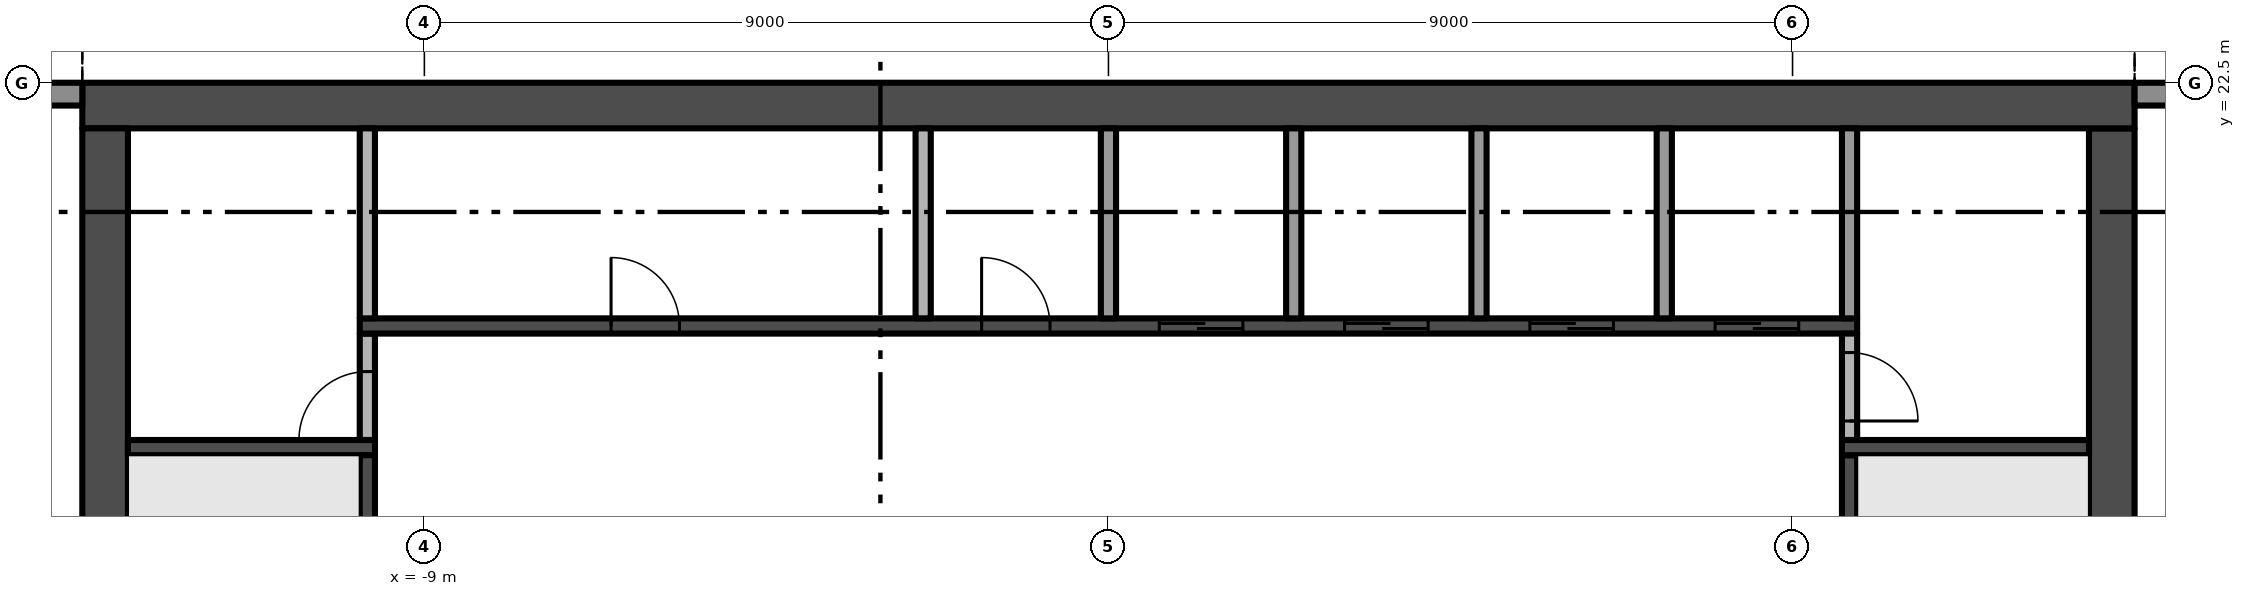
"""IFC4 building model, lengths in metres.
Left out: names, types, materials, properties, quantities, classifications, styles, units other than length and angle.
Written with IfcOpenShell. Run it as: python <this file> out.ifc"""

import sys

from ifc_helpers import new_model, si_unit, direction, frame, frame_2d, origin, place, context, subcontext, project, spatial, rectangle, extrude, element, fill, save


model = new_model("IFC4")
c1 = context("Model", 3, precision=1e-05, world=origin(), true_north=direction((0.0, 1.0)))
c2 = subcontext(c1, "Body", "Model", "MODEL_VIEW")
j1 = project(units=[si_unit("LENGTHUNIT", "METRE"), si_unit("PLANEANGLEUNIT", "RADIAN")], contexts=[c1])
p1 = place(None, origin())
s1 = spatial("IfcSite", under=j1, at=p1, CompositionType="ELEMENT")
p2 = place(p1, origin())
s2 = spatial("IfcBuilding", under=s1, at=p2, CompositionType="ELEMENT")
p3 = place(p2, frame((0.0, 0.0, 242.6)))
s3 = spatial("IfcBuildingStorey", under=s2, at=p3, CompositionType="ELEMENT", Elevation=242.6)
p4 = place(p3, frame((13.2, 5.1, -0.3), z_axis=(0.0, 0.0, 1.0), x_axis=(0.0, 1.0, 0.0)))
e1 = element("IfcWall", 1, at=p4, inside=s3, PredefinedType="SHEAR", context=c2, shape_type="SweptSolid", body=[
    extrude(rectangle(XDim=16.8, YDim=0.6, at=frame_2d((8.4, 0.0))), origin(), (0.0, 0.0, 1.0), 3.8),
])
p5 = place(p4, frame((6.3, 0.0, 0.3)))
e2 = element("IfcOpeningElement", 2, at=p5, cuts=e1, PredefinedType="OPENING", context=c2, shape_type="SweptSolid", body=[
    extrude(rectangle(XDim=1.2, YDim=2.2, at=frame_2d((0.6, 1.1))), frame((0.0, 0.31, 0.0), z_axis=(0.0, -1.0, 0.0), x_axis=(1.0, 0.0, 0.0)), (0.0, 0.0, 1.0), 0.62),
])
p6 = place(p3, frame((13.5, 22.2, -0.3), z_axis=(0.0, 0.0, 1.0), x_axis=(-1.0, 0.0, 0.0)))
e3 = element("IfcWall", 3, at=p6, inside=s3, PredefinedType="SHEAR", context=c2, shape_type="SweptSolid", body=[
    extrude(rectangle(XDim=27.0, YDim=0.6, at=frame_2d((13.5, 0.0))), origin(), (0.0, 0.0, 1.0), 3.8),
])
p7 = place(p3, frame((-13.2, 21.9, -0.3), z_axis=(0.0, 0.0, 1.0), x_axis=(0.0, -1.0, 0.0)))
e4 = element("IfcWall", 4, at=p7, inside=s3, PredefinedType="SHEAR", context=c2, shape_type="SweptSolid", body=[
    extrude(rectangle(XDim=16.8, YDim=0.6, at=frame_2d((8.4, 0.0))), origin(), (0.0, 0.0, 1.0), 3.8),
])
p8 = place(p7, frame((9.3, 0.0, 0.3)))
e5 = element("IfcOpeningElement", 5, at=p8, cuts=e4, PredefinedType="OPENING", context=c2, shape_type="SweptSolid", body=[
    extrude(rectangle(XDim=1.2, YDim=2.2, at=frame_2d((0.6, 1.1))), frame((0.0, 0.31, 0.0), z_axis=(0.0, -1.0, 0.0), x_axis=(1.0, 0.0, 0.0)), (0.0, 0.0, 1.0), 0.62),
])
p9 = place(p3, frame((13.5, 22.35, 0.0), z_axis=(0.0, 0.0, 1.0), x_axis=(1.0, 0.0, 0.0)))
e6 = element("IfcWall", 6, at=p9, inside=s3, PredefinedType="SOLIDWALL", context=c2, shape_type="SweptSolid", body=[
    extrude(rectangle(XDim=4.05, YDim=0.3, at=frame_2d((2.025, 0.0))), origin(), (0.0, 0.0, 1.0), 3.5),
])
p10 = place(p9, frame((0.55, 0.0, 0.45)))
e7 = element("IfcOpeningElement", 7, at=p10, cuts=e6, PredefinedType="OPENING", context=c2, shape_type="SweptSolid", body=[
    extrude(rectangle(XDim=3.2, YDim=2.65, at=frame_2d((1.6, 1.325))), frame((0.0, 0.16, 0.0), z_axis=(0.0, -1.0, 0.0), x_axis=(1.0, 0.0, 0.0)), (0.0, 0.0, 1.0), 0.32),
])
p11 = place(p3, frame((-17.55, 22.35, 0.0), z_axis=(0.0, 0.0, 1.0), x_axis=(1.0, 0.0, 0.0)))
e8 = element("IfcWall", 8, at=p11, inside=s3, PredefinedType="SOLIDWALL", context=c2, shape_type="SweptSolid", body=[
    extrude(rectangle(XDim=4.05, YDim=0.3, at=frame_2d((2.025, 0.0))), origin(), (0.0, 0.0, 1.0), 3.5),
])
p12 = place(p11, frame((0.3, 0.0, 0.0)))
e9 = element("IfcOpeningElement", 9, at=p12, cuts=e8, PredefinedType="OPENING", context=c2, shape_type="SweptSolid", body=[
    extrude(rectangle(XDim=3.2, YDim=2.4, at=frame_2d((1.6, 1.2))), frame((0.0, 0.16, 0.0), z_axis=(0.0, -1.0, 0.0), x_axis=(1.0, 0.0, 0.0)), (0.0, 0.0, 1.0), 0.32),
])
p13 = place(p3, frame((-12.9, 17.7, 0.0), z_axis=(0.0, 0.0, 1.0), x_axis=(1.0, 0.0, 0.0)))
e10 = element("IfcWall", 10, at=p13, inside=s3, PredefinedType="SHEAR", context=c2, shape_type="SweptSolid", body=[
    extrude(rectangle(XDim=3.25, YDim=0.2, at=frame_2d((1.625, 0.0))), origin(), (0.0, 0.0, 1.0), 3.5),
])
p14 = place(p3, frame((-9.75, 16.1, 0.0), z_axis=(0.0, 0.0, 1.0), x_axis=(0.0, 1.0, 0.0)))
e11 = element("IfcWall", 11, at=p14, inside=s3, PredefinedType="SHEAR", context=c2, shape_type="SweptSolid", body=[
    extrude(rectangle(XDim=1.5, YDim=0.2, at=frame_2d((0.75, 0.0))), origin(), (0.0, 0.0, 1.0), 3.5),
])
p15 = place(p3, frame((-9.75, 17.8, 0.0), z_axis=(0.0, 0.0, 1.0), x_axis=(0.0, 1.0, 0.0)))
e12 = element("IfcWall", 12, at=p15, inside=s3, PredefinedType="PARTITIONING", context=c2, shape_type="SweptSolid", body=[
    extrude(rectangle(XDim=1.4, YDim=0.2, at=frame_2d((0.7, 0.0))), origin(), (0.0, 0.0, 1.0), 3.5),
])
p16 = place(p15, origin())
e13 = element("IfcOpeningElement", 13, at=p16, cuts=e12, PredefinedType="OPENING", context=c2, shape_type="SweptSolid", body=[
    extrude(rectangle(XDim=0.9, YDim=2.1, at=frame_2d((0.45, 1.05))), frame((0.0, 0.11, 0.0), z_axis=(0.0, -1.0, 0.0), x_axis=(1.0, 0.0, 0.0)), (0.0, 0.0, 1.0), 0.22),
])
p17 = place(p3, frame((-9.85, 19.3, 0.0), z_axis=(0.0, 0.0, 1.0), x_axis=(1.0, 0.0, 0.0)))
e14 = element("IfcWall", 14, at=p17, inside=s3, PredefinedType="SHEAR", context=c2, shape_type="SweptSolid", body=[
    extrude(rectangle(XDim=19.7, YDim=0.2, at=frame_2d((9.85, 0.0))), origin(), (0.0, 0.0, 1.0), 3.5),
])
p18 = place(p17, frame((10.519, 0.0, 0.0)))
e15 = element("IfcOpeningElement", 15, at=p18, cuts=e14, PredefinedType="OPENING", context=c2, shape_type="SweptSolid", body=[
    extrude(rectangle(XDim=1.1, YDim=2.1, at=frame_2d((0.55, 1.05))), frame((0.0, 0.11, 0.0), z_axis=(0.0, -1.0, 0.0), x_axis=(1.0, 0.0, 0.0)), (0.0, 0.0, 1.0), 0.22),
])
p19 = place(p17, frame((12.956, 0.0, 0.0)))
e16 = element("IfcOpeningElement", 16, at=p19, cuts=e14, PredefinedType="OPENING", context=c2, shape_type="SweptSolid", body=[
    extrude(rectangle(XDim=1.1, YDim=2.1, at=frame_2d((0.55, 1.05))), frame((0.0, 0.11, 0.0), z_axis=(0.0, -1.0, 0.0), x_axis=(1.0, 0.0, 0.0)), (0.0, 0.0, 1.0), 0.22),
])
p20 = place(p17, frame((15.394, 0.0, 0.0)))
e17 = element("IfcOpeningElement", 17, at=p20, cuts=e14, PredefinedType="OPENING", context=c2, shape_type="SweptSolid", body=[
    extrude(rectangle(XDim=1.1, YDim=2.1, at=frame_2d((0.55, 1.05))), frame((0.0, 0.11, 0.0), z_axis=(0.0, -1.0, 0.0), x_axis=(1.0, 0.0, 0.0)), (0.0, 0.0, 1.0), 0.22),
])
p21 = place(p17, frame((17.831, 0.0, 0.0)))
e18 = element("IfcOpeningElement", 18, at=p21, cuts=e14, PredefinedType="OPENING", context=c2, shape_type="SweptSolid", body=[
    extrude(rectangle(XDim=1.1, YDim=2.1, at=frame_2d((0.55, 1.05))), frame((0.0, 0.11, 0.0), z_axis=(0.0, -1.0, 0.0), x_axis=(1.0, 0.0, 0.0)), (0.0, 0.0, 1.0), 0.22),
])
p22 = place(p17, frame((3.306, 0.0, 0.0)))
e19 = element("IfcOpeningElement", 19, at=p22, cuts=e14, PredefinedType="OPENING", context=c2, shape_type="SweptSolid", body=[
    extrude(rectangle(XDim=0.9, YDim=2.1, at=frame_2d((0.45, 1.05))), frame((0.0, 0.11, 0.0), z_axis=(0.0, -1.0, 0.0), x_axis=(1.0, 0.0, 0.0)), (0.0, 0.0, 1.0), 0.22),
])
p23 = place(p17, frame((8.181, 0.0, 0.0)))
e20 = element("IfcOpeningElement", 20, at=p23, cuts=e14, PredefinedType="OPENING", context=c2, shape_type="SweptSolid", body=[
    extrude(rectangle(XDim=0.9, YDim=2.1, at=frame_2d((0.45, 1.05))), frame((0.0, 0.11, 0.0), z_axis=(0.0, -1.0, 0.0), x_axis=(1.0, 0.0, 0.0)), (0.0, 0.0, 1.0), 0.22),
])
for number, where, z_axis, x_axis in (
    (21, (-9.75, 19.4, 0.0), (0.0, 0.0, 1.0), (0.0, 1.0, 0.0)),
    (22, (-2.438, 19.4, 0.0), (0.0, 0.0, 1.0), (0.0, 1.0, 0.0)),
    (23, (0.0, 19.4, 0.0), (0.0, 0.0, 1.0), (0.0, 1.0, 0.0)),
    (24, (2.438, 19.4, 0.0), (0.0, 0.0, 1.0), (0.0, 1.0, 0.0)),
    (25, (4.875, 19.4, 0.0), (0.0, 0.0, 1.0), (0.0, 1.0, 0.0)),
    (26, (7.312, 19.4, 0.0), (0.0, 0.0, 1.0), (0.0, 1.0, 0.0)),
):
    element("IfcWall", number, at=place(p3, frame(where, z_axis=z_axis, x_axis=x_axis)), inside=s3, PredefinedType="PARTITIONING", context=c2, shape_type="SweptSolid", body=[
        extrude(rectangle(XDim=2.5, YDim=0.2, at=frame_2d((1.25, 0.0))), origin(), (0.0, 0.0, 1.0), 3.5),
    ])
p24 = place(p3, frame((9.75, 16.1, 0.0), z_axis=(0.0, 0.0, 1.0), x_axis=(0.0, 1.0, 0.0)))
e27 = element("IfcWall", 27, at=p24, inside=s3, PredefinedType="SHEAR", context=c2, shape_type="SweptSolid", body=[
    extrude(rectangle(XDim=1.5, YDim=0.2, at=frame_2d((0.75, 0.0))), origin(), (0.0, 0.0, 1.0), 3.5),
])
p25 = place(p3, frame((9.65, 17.7, 0.0), z_axis=(0.0, 0.0, 1.0), x_axis=(1.0, 0.0, 0.0)))
e28 = element("IfcWall", 28, at=p25, inside=s3, PredefinedType="SHEAR", context=c2, shape_type="SweptSolid", body=[
    extrude(rectangle(XDim=3.25, YDim=0.2, at=frame_2d((1.625, 0.0))), origin(), (0.0, 0.0, 1.0), 3.5),
])
p26 = place(p3, frame((9.75, 19.2, 0.0), z_axis=(0.0, 0.0, 1.0), x_axis=(0.0, -1.0, 0.0)))
e29 = element("IfcWall", 29, at=p26, inside=s3, PredefinedType="PARTITIONING", context=c2, shape_type="SweptSolid", body=[
    extrude(rectangle(XDim=1.4, YDim=0.2, at=frame_2d((0.7, 0.0))), origin(), (0.0, 0.0, 1.0), 3.5),
])
p27 = place(p26, frame((0.25, 0.0, 0.0)))
e30 = element("IfcOpeningElement", 30, at=p27, cuts=e29, PredefinedType="OPENING", context=c2, shape_type="SweptSolid", body=[
    extrude(rectangle(XDim=0.9, YDim=2.1, at=frame_2d((0.45, 1.05))), frame((0.0, 0.11, 0.0), z_axis=(0.0, -1.0, 0.0), x_axis=(1.0, 0.0, 0.0)), (0.0, 0.0, 1.0), 0.22),
])
p28 = place(p3, frame((9.75, 19.4, 0.0), z_axis=(0.0, 0.0, 1.0), x_axis=(0.0, 1.0, 0.0)))
e31 = element("IfcWall", 31, at=p28, inside=s3, PredefinedType="PARTITIONING", context=c2, shape_type="SweptSolid", body=[
    extrude(rectangle(XDim=2.5, YDim=0.2, at=frame_2d((1.25, 0.0))), origin(), (0.0, 0.0, 1.0), 3.5),
])
p29 = place(p18, origin())
e32 = element("IfcDoor", 32, at=p29, inside=s3, OperationType="SLIDING_TO_RIGHT", PredefinedType="DOOR", context=c2, shape_type="SweptSolid", body=[
    extrude(rectangle(XDim=1.1, YDim=2.1, at=frame_2d((0.55, 1.05))), frame((0.0, 0.025, 0.0), z_axis=(0.0, -1.0, 0.0), x_axis=(1.0, 0.0, 0.0)), (0.0, 0.0, 1.0), 0.05),
])
fill(e15, e32)
p30 = place(p19, origin())
e33 = element("IfcDoor", 33, at=p30, inside=s3, OperationType="SLIDING_TO_RIGHT", PredefinedType="DOOR", context=c2, shape_type="SweptSolid", body=[
    extrude(rectangle(XDim=1.1, YDim=2.1, at=frame_2d((0.55, 1.05))), frame((0.0, 0.025, 0.0), z_axis=(0.0, -1.0, 0.0), x_axis=(1.0, 0.0, 0.0)), (0.0, 0.0, 1.0), 0.05),
])
fill(e16, e33)
p31 = place(p20, origin())
e34 = element("IfcDoor", 34, at=p31, inside=s3, OperationType="SLIDING_TO_RIGHT", PredefinedType="DOOR", context=c2, shape_type="SweptSolid", body=[
    extrude(rectangle(XDim=1.1, YDim=2.1, at=frame_2d((0.55, 1.05))), frame((0.0, 0.025, 0.0), z_axis=(0.0, -1.0, 0.0), x_axis=(1.0, 0.0, 0.0)), (0.0, 0.0, 1.0), 0.05),
])
fill(e17, e34)
p32 = place(p21, origin())
e35 = element("IfcDoor", 35, at=p32, inside=s3, OperationType="SLIDING_TO_RIGHT", PredefinedType="DOOR", context=c2, shape_type="SweptSolid", body=[
    extrude(rectangle(XDim=1.1, YDim=2.1, at=frame_2d((0.55, 1.05))), frame((0.0, 0.025, 0.0), z_axis=(0.0, -1.0, 0.0), x_axis=(1.0, 0.0, 0.0)), (0.0, 0.0, 1.0), 0.05),
])
fill(e18, e35)
p33 = place(p16, origin())
e36 = element("IfcDoor", 36, at=p33, inside=s3, OperationType="SINGLE_SWING_LEFT", PredefinedType="DOOR", context=c2, shape_type="SweptSolid", body=[
    extrude(rectangle(XDim=0.9, YDim=2.1, at=frame_2d((0.45, 1.05))), frame((0.0, 0.025, 0.0), z_axis=(0.0, -1.0, 0.0), x_axis=(1.0, 0.0, 0.0)), (0.0, 0.0, 1.0), 0.05),
])
fill(e13, e36)
p34 = place(p27, origin())
e37 = element("IfcDoor", 37, at=p34, inside=s3, OperationType="SINGLE_SWING_RIGHT", PredefinedType="DOOR", context=c2, shape_type="SweptSolid", body=[
    extrude(rectangle(XDim=0.9, YDim=2.1, at=frame_2d((0.45, 1.05))), frame((0.0, 0.025, 0.0), z_axis=(0.0, -1.0, 0.0), x_axis=(1.0, 0.0, 0.0)), (0.0, 0.0, 1.0), 0.05),
])
fill(e30, e37)
p35 = place(p22, origin())
e38 = element("IfcDoor", 38, at=p35, inside=s3, OperationType="SINGLE_SWING_LEFT", PredefinedType="DOOR", context=c2, shape_type="SweptSolid", body=[
    extrude(rectangle(XDim=0.9, YDim=2.1, at=frame_2d((0.45, 1.05))), frame((0.0, 0.025, 0.0), z_axis=(0.0, -1.0, 0.0), x_axis=(1.0, 0.0, 0.0)), (0.0, 0.0, 1.0), 0.05),
])
fill(e19, e38)
p36 = place(p23, origin())
e39 = element("IfcDoor", 39, at=p36, inside=s3, OperationType="SINGLE_SWING_LEFT", PredefinedType="DOOR", context=c2, shape_type="SweptSolid", body=[
    extrude(rectangle(XDim=0.9, YDim=2.1, at=frame_2d((0.45, 1.05))), frame((0.0, 0.025, 0.0), z_axis=(0.0, -1.0, 0.0), x_axis=(1.0, 0.0, 0.0)), (0.0, 0.0, 1.0), 0.05),
])
fill(e20, e39)
save(model, sys.argv[1])
